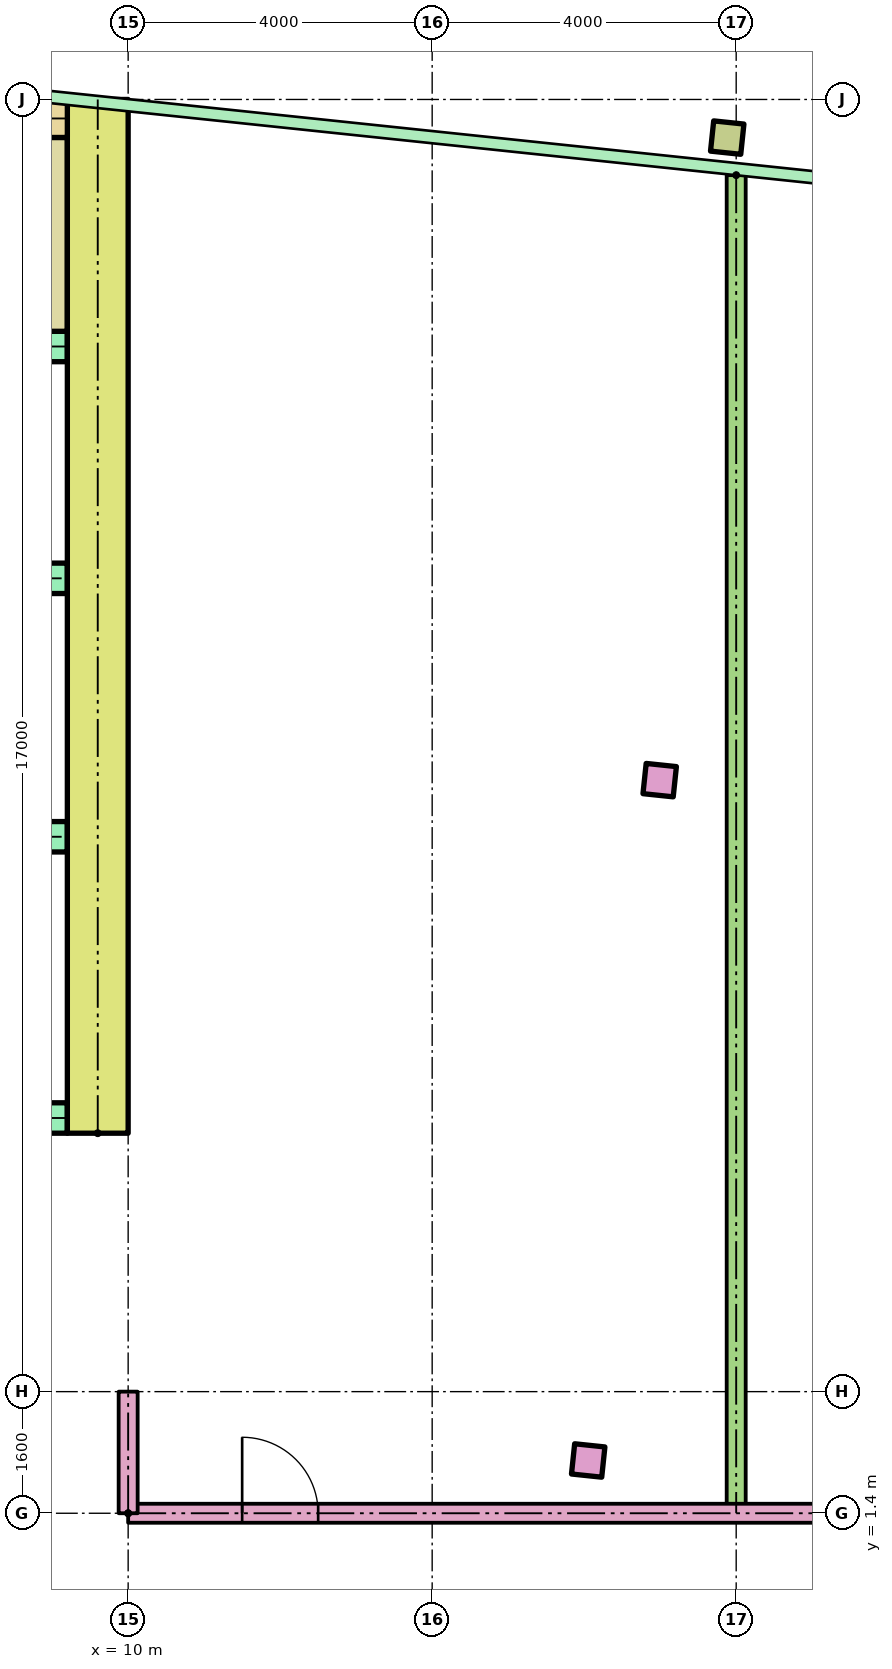
"""IFC4 building model, lengths in metres.
Left out: names, types, materials, properties, quantities, classifications, styles, units other than length and angle.
Written with IfcOpenShell. Run it as: python <this file> out.ifc"""

import sys

from ifc_helpers import new_model, si_unit, direction, frame, frame_2d, origin, origin_2d, place, context, subcontext, project, spatial, rectangle, hollow_rectangle, extrude, element, fill, save


model = new_model("IFC4")
c1 = context("Model", 3, precision=1e-05, world=origin(), true_north=direction((0.0, 1.0)))
c2 = subcontext(c1, "Body", "Model", "MODEL_VIEW")
j1 = project(units=[si_unit("LENGTHUNIT", "METRE"), si_unit("PLANEANGLEUNIT", "RADIAN")], contexts=[c1])
p1 = place(None, origin())
s1 = spatial("IfcSite", under=j1, at=p1, CompositionType="ELEMENT")
p2 = place(p1, origin())
s2 = spatial("IfcBuilding", under=s1, at=p2, CompositionType="ELEMENT")
p3 = place(p2, frame((0.0, 0.0, 294.9)))
s3 = spatial("IfcBuildingStorey", under=s2, at=p3, CompositionType="ELEMENT", Elevation=294.9)
for number, where, z_axis, x_axis in (
    (1, (16.053, 2.094, 0.0), (0.0, 0.0, 1.0), (0.995, -0.105, 0.0)),
    (2, (16.993, 11.045, 0.0), (0.0, 0.0, 1.0), (0.995, -0.105, 0.0)),
):
    element("IfcColumn", number, at=place(p3, frame(where, z_axis=z_axis, x_axis=x_axis)), inside=s3, PredefinedType="COLUMN", context=c2, shape_type="SweptSolid", body=[
        extrude(rectangle(XDim=0.4, YDim=0.4, at=origin_2d()), origin(), (0.0, 0.0, 1.0), 3.4),
    ])
p4 = place(p3, frame((17.882, 19.498, 0.0), z_axis=(0.0, 0.0, 1.0), x_axis=(0.994521895368, -0.104528463268, 0.0)))
e3 = element("IfcColumn", 3, at=p4, inside=s3, PredefinedType="COLUMN", context=c2, shape_type="SweptSolid", body=[
    extrude(hollow_rectangle(XDim=0.4, YDim=0.4, WallThickness=0.02, at=origin_2d()), origin(), (0.0, 0.0, 1.0), 3.4),
])
p5 = place(p3, frame((9.6, 6.4, 0.0), z_axis=(0.0, 0.0, 1.0), x_axis=(0.0, 1.0, 0.0)))
e4 = element("IfcWall", 4, at=p5, inside=s3, PredefinedType="SHEAR", context=c2, shape_type="SweptSolid", body=[
    extrude(rectangle(XDim=13.6, YDim=0.8, at=frame_2d((6.8, 0.0))), origin(), (0.0, 0.0, 1.0), 3.12),
])
p6 = place(p3, frame((-9.2, 19.75, 0.0)))
e5 = element("IfcWall", 5, at=p6, inside=s3, PredefinedType="SHEAR", context=c2, shape_type="SweptSolid", body=[
    extrude(rectangle(XDim=18.4, YDim=0.5, at=frame_2d((9.2, 0.0))), origin(), (0.0, 0.0, 1.0), 3.12),
])
p7 = place(p3, frame((-9.2, 6.6, 0.0)))
e6 = element("IfcWall", 6, at=p7, inside=s3, PredefinedType="SHEAR", context=c2, shape_type="SweptSolid", body=[
    extrude(rectangle(XDim=18.4, YDim=0.4, at=frame_2d((9.2, 0.0))), origin(), (0.0, 0.0, 1.0), 3.12),
])
p8 = place(p7, frame((8.3, 0.0, 0.0)))
e7 = element("IfcOpeningElement", 7, at=p8, cuts=e6, PredefinedType="OPENING", context=c2, shape_type="SweptSolid", body=[
    extrude(rectangle(XDim=1.8, YDim=2.1, at=frame_2d((0.9, 1.05))), frame((0.0, 0.21, 0.0), z_axis=(0.0, -1.0, 0.0), x_axis=(1.0, 0.0, 0.0)), (0.0, 0.0, 1.0), 0.42),
])
p9 = place(p7, frame((3.8, 0.0, 0.0)))
e8 = element("IfcOpeningElement", 8, at=p9, cuts=e6, PredefinedType="OPENING", context=c2, shape_type="SweptSolid", body=[
    extrude(rectangle(XDim=1.8, YDim=2.1, at=frame_2d((0.9, 1.05))), frame((0.0, 0.21, 0.0), z_axis=(0.0, -1.0, 0.0), x_axis=(1.0, 0.0, 0.0)), (0.0, 0.0, 1.0), 0.42),
])
p10 = place(p7, frame((12.8, 0.0, 0.0)))
e9 = element("IfcOpeningElement", 9, at=p10, cuts=e6, PredefinedType="OPENING", context=c2, shape_type="SweptSolid", body=[
    extrude(rectangle(XDim=1.8, YDim=2.1, at=frame_2d((0.9, 1.05))), frame((0.0, 0.21, 0.0), z_axis=(0.0, -1.0, 0.0), x_axis=(1.0, 0.0, 0.0)), (0.0, 0.0, 1.0), 0.42),
])
p11 = place(p3, frame((1.2, 10.3, 0.0)))
e10 = element("IfcWall", 10, at=p11, inside=s3, PredefinedType="SHEAR", context=c2, shape_type="SweptSolid", body=[
    extrude(rectangle(XDim=8.0, YDim=0.4, at=frame_2d((4.0, 0.0))), origin(), (0.0, 0.0, 1.0), 3.12),
])
p12 = place(p11, frame((0.817, 0.0, 0.0)))
e11 = element("IfcOpeningElement", 11, at=p12, cuts=e10, PredefinedType="OPENING", context=c2, shape_type="SweptSolid", body=[
    extrude(rectangle(XDim=1.1, YDim=2.1, at=frame_2d((0.55, 1.05))), frame((0.0, 0.21, 0.0), z_axis=(0.0, -1.0, 0.0), x_axis=(1.0, 0.0, 0.0)), (0.0, 0.0, 1.0), 0.42),
])
p13 = place(p11, frame((3.55, 0.0, 0.0)))
e12 = element("IfcOpeningElement", 12, at=p13, cuts=e10, PredefinedType="OPENING", context=c2, shape_type="SweptSolid", body=[
    extrude(rectangle(XDim=1.1, YDim=2.1, at=frame_2d((0.55, 1.05))), frame((0.0, 0.21, 0.0), z_axis=(0.0, -1.0, 0.0), x_axis=(1.0, 0.0, 0.0)), (0.0, 0.0, 1.0), 0.42),
])
p14 = place(p11, frame((6.283, 0.0, 0.0)))
e13 = element("IfcOpeningElement", 13, at=p14, cuts=e10, PredefinedType="OPENING", context=c2, shape_type="SweptSolid", body=[
    extrude(rectangle(XDim=1.1, YDim=2.1, at=frame_2d((0.55, 1.05))), frame((0.0, 0.21, 0.0), z_axis=(0.0, -1.0, 0.0), x_axis=(1.0, 0.0, 0.0)), (0.0, 0.0, 1.0), 0.42),
])
p15 = place(p3, frame((1.2, 13.7, 0.0)))
e14 = element("IfcWall", 14, at=p15, inside=s3, PredefinedType="SHEAR", context=c2, shape_type="SweptSolid", body=[
    extrude(rectangle(XDim=8.0, YDim=0.4, at=frame_2d((4.0, 0.0))), origin(), (0.0, 0.0, 1.0), 3.12),
])
p16 = place(p3, frame((-9.2, 16.75, 0.0)))
e15 = element("IfcWall", 15, at=p16, inside=s3, PredefinedType="SHEAR", context=c2, shape_type="SweptSolid", body=[
    extrude(rectangle(XDim=18.4, YDim=0.4, at=frame_2d((9.2, 0.0))), origin(), (0.0, 0.0, 1.0), 3.12),
])
p17 = place(p16, frame((0.1, 0.0, 0.0)))
e16 = element("IfcOpeningElement", 16, at=p17, cuts=e15, PredefinedType="OPENING", context=c2, shape_type="SweptSolid", body=[
    extrude(rectangle(XDim=0.95, YDim=2.1, at=frame_2d((0.475, 1.05))), frame((0.0, 0.21, 0.0), z_axis=(0.0, -1.0, 0.0), x_axis=(1.0, 0.0, 0.0)), (0.0, 0.0, 1.0), 0.42),
])
p18 = place(p16, frame((6.1, 0.0, 0.0)))
e17 = element("IfcOpeningElement", 17, at=p18, cuts=e15, PredefinedType="OPENING", context=c2, shape_type="SweptSolid", body=[
    extrude(rectangle(XDim=0.95, YDim=2.1, at=frame_2d((0.475, 1.05))), frame((0.0, 0.21, 0.0), z_axis=(0.0, -1.0, 0.0), x_axis=(1.0, 0.0, 0.0)), (0.0, 0.0, 1.0), 0.42),
])
p19 = place(p16, frame((12.1, 0.0, 0.0)))
e18 = element("IfcOpeningElement", 18, at=p19, cuts=e15, PredefinedType="OPENING", context=c2, shape_type="SweptSolid", body=[
    extrude(rectangle(XDim=0.95, YDim=2.1, at=frame_2d((0.475, 1.05))), frame((0.0, 0.21, 0.0), z_axis=(0.0, -1.0, 0.0), x_axis=(1.0, 0.0, 0.0)), (0.0, 0.0, 1.0), 0.42),
])
p20 = place(p3, frame((8.75, 16.95, 0.0), z_axis=(0.0, 0.0, 1.0), x_axis=(0.0, 1.0, 0.0)))
e19 = element("IfcWall", 19, at=p20, inside=s3, PredefinedType="SHEAR", context=c2, shape_type="SweptSolid", body=[
    extrude(rectangle(XDim=2.55, YDim=0.9, at=frame_2d((1.275, 0.0))), origin(), (0.0, 0.0, 1.0), 3.12),
])
p21 = place(p3, frame((10.0, 1.4, 0.0)))
e20 = element("IfcWall", 20, at=p21, inside=s3, PredefinedType="PARTITIONING", context=c2, shape_type="SweptSolid", body=[
    extrude(rectangle(XDim=15.0, YDim=0.25, at=frame_2d((7.5, 0.0))), origin(), (0.0, 0.0, 1.0), 2.6),
])
p22 = place(p21, frame((1.5, 0.0, 0.0)))
e21 = element("IfcOpeningElement", 21, at=p22, cuts=e20, PredefinedType="OPENING", context=c2, shape_type="SweptSolid", body=[
    extrude(rectangle(XDim=1.0, YDim=2.1, at=frame_2d((0.5, 1.05))), frame((0.0, 0.135, 0.0), z_axis=(0.0, -1.0, 0.0), x_axis=(1.0, 0.0, 0.0)), (0.0, 0.0, 1.0), 0.27),
])
p23 = place(p21, frame((9.5, 0.0, 0.0)))
e22 = element("IfcOpeningElement", 22, at=p23, cuts=e20, PredefinedType="OPENING", context=c2, shape_type="SweptSolid", body=[
    extrude(rectangle(XDim=1.0, YDim=2.1, at=frame_2d((0.5, 1.05))), frame((0.0, 0.135, 0.0), z_axis=(0.0, -1.0, 0.0), x_axis=(1.0, 0.0, 0.0)), (0.0, 0.0, 1.0), 0.27),
])
p24 = place(p3, frame((18.0, 19.004, 0.0), z_axis=(0.0, 0.0, 1.0), x_axis=(0.0, -1.0, 0.0)))
e23 = element("IfcWall", 23, at=p24, inside=s3, PredefinedType="PARTITIONING", context=c2, shape_type="SweptSolid", body=[
    extrude(rectangle(XDim=17.604, YDim=0.25, at=frame_2d((8.802, 0.0))), origin(), (0.0, 0.0, 1.0), 2.6),
])
p25 = place(p3, frame((10.0, 1.4, 0.0), z_axis=(0.0, 0.0, 1.0), x_axis=(0.0, 1.0, 0.0)))
e24 = element("IfcWall", 24, at=p25, inside=s3, PredefinedType="PARTITIONING", context=c2, shape_type="SweptSolid", body=[
    extrude(rectangle(XDim=1.6, YDim=0.25, at=frame_2d((0.8, 0.0))), origin(), (0.0, 0.0, 1.0), 2.6),
])
p26 = place(p22, origin())
e25 = element("IfcDoor", 25, at=p26, inside=s3, OperationType="SINGLE_SWING_LEFT", PredefinedType="DOOR", context=c2, shape_type="SweptSolid", body=[
    extrude(rectangle(XDim=1.0, YDim=2.1, at=frame_2d((0.5, 1.05))), frame((0.0, 0.025, 0.0), z_axis=(0.0, -1.0, 0.0), x_axis=(1.0, 0.0, 0.0)), (0.0, 0.0, 1.0), 0.05),
])
fill(e21, e25)
save(model, sys.argv[1])
